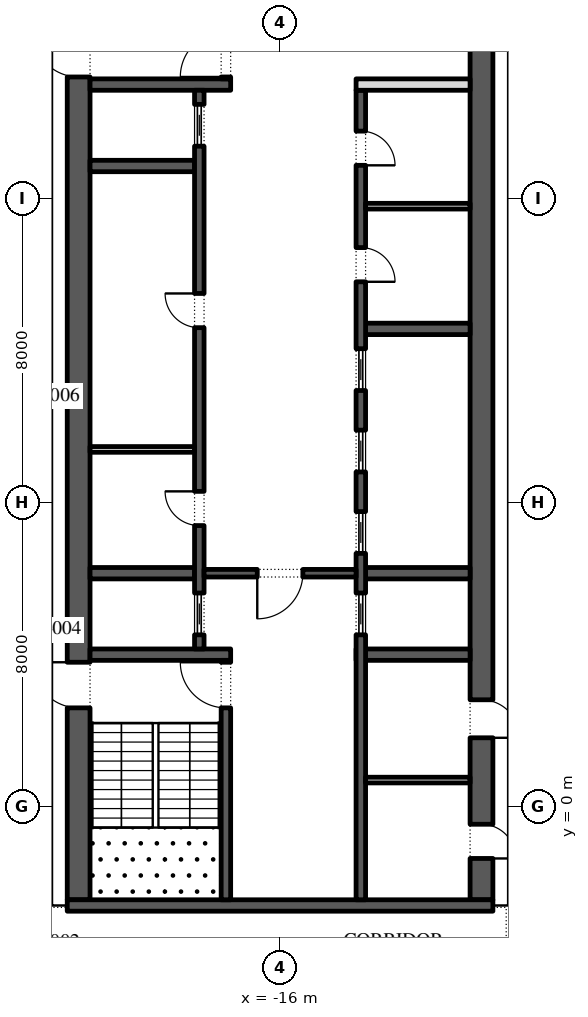
"""IFC4 building model, lengths in metres.
Left out: names, types, materials, properties, quantities, classifications, styles, units other than length and angle.
Written with IfcOpenShell. Run it as: python <this file> out.ifc"""

import sys

from ifc_helpers import new_model, si_unit, direction, frame, frame_2d, origin, place, context, subcontext, project, spatial, rectangle, extrude, element, fill, save


model = new_model("IFC4")
c1 = context("Model", 3, precision=1e-05, world=origin(), true_north=direction((0.0, 1.0)))
c2 = subcontext(c1, "Body", "Model", "MODEL_VIEW")
j1 = project(units=[si_unit("LENGTHUNIT", "METRE"), si_unit("PLANEANGLEUNIT", "RADIAN")], contexts=[c1])
p1 = place(None, origin())
s1 = spatial("IfcSite", under=j1, at=p1, CompositionType="ELEMENT")
p2 = place(p1, origin())
s2 = spatial("IfcBuilding", under=s1, at=p2, CompositionType="ELEMENT")
p3 = place(p2, frame((0.0, 0.0, 272.4)))
s3 = spatial("IfcBuildingStorey", under=s2, at=p3, CompositionType="ELEMENT", Elevation=272.4)
p4 = place(p3, frame((-21.359, 48.678, 0.0), z_axis=(0.0, 0.0, 1.0), x_axis=(-0.224949198343, -0.974370493275, 0.0)))
e1 = element("IfcWall", 1, at=p4, inside=s3, PredefinedType="STANDARD", context=c2, shape_type="SweptSolid", body=[
    extrude(rectangle(XDim=49.5, YDim=0.3, at=frame_2d((24.75, 0.0))), origin(), (0.0, 0.0, 1.0), 4.0),
])
p5 = place(p4, frame((1.157, 0.0, 0.45)))
e2 = element("IfcOpeningElement", 2, at=p5, cuts=e1, PredefinedType="OPENING", context=c2, shape_type="SweptSolid", body=[
    extrude(rectangle(XDim=4.5, YDim=3.05, at=frame_2d((2.25, 1.525))), frame((0.0, 0.16, 0.0), z_axis=(0.0, -1.0, 0.0), x_axis=(1.0, 0.0, 0.0)), (0.0, 0.0, 1.0), 0.32),
])
p6 = place(p4, frame((9.171, 0.0, 0.0)))
e3 = element("IfcOpeningElement", 3, at=p6, cuts=e1, PredefinedType="OPENING", context=c2, shape_type="SweptSolid", body=[
    extrude(rectangle(XDim=2.4, YDim=3.5, at=frame_2d((1.2, 1.75))), frame((0.0, 0.16, 0.0), z_axis=(0.0, -1.0, 0.0), x_axis=(1.0, 0.0, 0.0)), (0.0, 0.0, 1.0), 0.32),
])
p7 = place(p4, frame((15.236, 0.0, 0.45)))
e4 = element("IfcOpeningElement", 4, at=p7, cuts=e1, PredefinedType="OPENING", context=c2, shape_type="SweptSolid", body=[
    extrude(rectangle(XDim=4.5, YDim=3.05, at=frame_2d((2.25, 1.525))), frame((0.0, 0.16, 0.0), z_axis=(0.0, -1.0, 0.0), x_axis=(1.0, 0.0, 0.0)), (0.0, 0.0, 1.0), 0.32),
])
p8 = place(p4, frame((22.35, 0.0, 0.45)))
e5 = element("IfcOpeningElement", 5, at=p8, cuts=e1, PredefinedType="OPENING", context=c2, shape_type="SweptSolid", body=[
    extrude(rectangle(XDim=4.5, YDim=3.05, at=frame_2d((2.25, 1.525))), frame((0.0, 0.16, 0.0), z_axis=(0.0, -1.0, 0.0), x_axis=(1.0, 0.0, 0.0)), (0.0, 0.0, 1.0), 0.32),
])
p9 = place(p4, frame((29.464, 0.0, 0.45)))
e6 = element("IfcOpeningElement", 6, at=p9, cuts=e1, PredefinedType="OPENING", context=c2, shape_type="SweptSolid", body=[
    extrude(rectangle(XDim=4.5, YDim=3.05, at=frame_2d((2.25, 1.525))), frame((0.0, 0.16, 0.0), z_axis=(0.0, -1.0, 0.0), x_axis=(1.0, 0.0, 0.0)), (0.0, 0.0, 1.0), 0.32),
])
p10 = place(p4, frame((37.628, 0.0, 0.0)))
e7 = element("IfcOpeningElement", 7, at=p10, cuts=e1, PredefinedType="OPENING", context=c2, shape_type="SweptSolid", body=[
    extrude(rectangle(XDim=2.4, YDim=3.325, at=frame_2d((1.2, 1.663))), frame((0.0, 0.16, 0.0), z_axis=(0.0, -1.0, 0.0), x_axis=(1.0, 0.0, 0.0)), (0.0, 0.0, 1.0), 0.32),
])
p11 = place(p4, frame((43.693, 0.0, 0.45)))
e8 = element("IfcOpeningElement", 8, at=p11, cuts=e1, PredefinedType="OPENING", context=c2, shape_type="SweptSolid", body=[
    extrude(rectangle(XDim=4.5, YDim=2.825, at=frame_2d((2.25, 1.413))), frame((0.0, 0.16, 0.0), z_axis=(0.0, -1.0, 0.0), x_axis=(1.0, 0.0, 0.0)), (0.0, 0.0, 1.0), 0.32),
])
p12 = place(p3, frame((-21.3, -2.45, 0.0), z_axis=(0.0, 0.0, 1.0), x_axis=(0.0, 1.0, 0.0)))
e9 = element("IfcWall", 9, at=p12, inside=s3, PredefinedType="SHEAR", context=c2, shape_type="SweptSolid", body=[
    extrude(rectangle(XDim=27.9, YDim=0.6, at=frame_2d((13.95, 0.0))), origin(), (0.0, 0.0, 1.0), 4.0),
])
p13 = place(p12, frame((5.05, 0.0, 0.0)))
e10 = element("IfcOpeningElement", 10, at=p13, cuts=e9, PredefinedType="OPENING", context=c2, shape_type="SweptSolid", body=[
    extrude(rectangle(XDim=1.2, YDim=2.1, at=frame_2d((0.6, 1.05))), frame((0.0, 0.31, 0.0), z_axis=(0.0, -1.0, 0.0), x_axis=(1.0, 0.0, 0.0)), (0.0, 0.0, 1.0), 0.62),
])
p14 = place(p12, frame((21.65, 0.0, 0.0)))
e11 = element("IfcOpeningElement", 11, at=p14, cuts=e9, PredefinedType="OPENING", context=c2, shape_type="SweptSolid", body=[
    extrude(rectangle(XDim=1.2, YDim=2.1, at=frame_2d((0.6, 1.05))), frame((0.0, 0.31, 0.0), z_axis=(0.0, -1.0, 0.0), x_axis=(1.0, 0.0, 0.0)), (0.0, 0.0, 1.0), 0.62),
])
p15 = place(p3, frame((-10.7, -2.45, 0.0), z_axis=(0.0, 0.0, 1.0), x_axis=(0.0, 1.0, 0.0)))
e12 = element("IfcWall", 12, at=p15, inside=s3, PredefinedType="SHEAR", context=c2, shape_type="SweptSolid", body=[
    extrude(rectangle(XDim=27.9, YDim=0.6, at=frame_2d((13.95, 0.0))), origin(), (0.0, 0.0, 1.0), 4.0),
])
p16 = place(p15, frame((23.65, 0.0, 0.0)))
e13 = element("IfcOpeningElement", 13, at=p16, cuts=e12, PredefinedType="OPENING", context=c2, shape_type="SweptSolid", body=[
    extrude(rectangle(XDim=2.4, YDim=2.1, at=frame_2d((1.2, 1.05))), frame((0.0, 0.31, 0.0), z_axis=(0.0, -1.0, 0.0), x_axis=(1.0, 0.0, 0.0)), (0.0, 0.0, 1.0), 0.62),
])
p17 = place(p15, frame((1.087, 0.0, 0.0)))
e14 = element("IfcOpeningElement", 14, at=p17, cuts=e12, PredefinedType="OPENING", context=c2, shape_type="SweptSolid", body=[
    extrude(rectangle(XDim=0.9, YDim=2.1, at=frame_2d((0.45, 1.05))), frame((0.0, 0.31, 0.0), z_axis=(0.0, -1.0, 0.0), x_axis=(1.0, 0.0, 0.0)), (0.0, 0.0, 1.0), 0.62),
])
p18 = place(p15, frame((4.262, 0.0, 0.0)))
e15 = element("IfcOpeningElement", 15, at=p18, cuts=e12, PredefinedType="OPENING", context=c2, shape_type="SweptSolid", body=[
    extrude(rectangle(XDim=1.0, YDim=2.1, at=frame_2d((0.5, 1.05))), frame((0.0, 0.31, 0.0), z_axis=(0.0, -1.0, 0.0), x_axis=(1.0, 0.0, 0.0)), (0.0, 0.0, 1.0), 0.62),
])
p19 = place(p3, frame((-21.6, -2.6, 0.0), z_axis=(0.0, 0.0, 1.0), x_axis=(1.0, 0.0, 0.0)))
e16 = element("IfcWall", 16, at=p19, inside=s3, PredefinedType="SHEAR", context=c2, shape_type="SweptSolid", body=[
    extrude(rectangle(XDim=11.2, YDim=0.3, at=frame_2d((5.6, 0.0))), origin(), (0.0, 0.0, 1.0), 4.0),
])
p20 = place(p3, frame((-21.0, 4.0, 0.0), z_axis=(0.0, 0.0, 1.0), x_axis=(1.0, 0.0, 0.0)))
e17 = element("IfcWall", 17, at=p20, inside=s3, PredefinedType="SHEAR", context=c2, shape_type="SweptSolid", body=[
    extrude(rectangle(XDim=3.7, YDim=0.3, at=frame_2d((1.85, 0.0))), origin(), (0.0, 0.0, 1.0), 4.0),
])
p21 = place(p3, frame((-17.425, -2.45, 0.0), z_axis=(0.0, 0.0, 1.0), x_axis=(0.0, 1.0, 0.0)))
e18 = element("IfcWall", 18, at=p21, inside=s3, PredefinedType="SHEAR", context=c2, shape_type="SweptSolid", body=[
    extrude(rectangle(XDim=6.3, YDim=0.25, at=frame_2d((3.15, 0.0))), origin(), (0.0, 0.0, 1.0), 4.0),
])
p22 = place(p21, frame((5.05, 0.0, 0.0)))
e19 = element("IfcOpeningElement", 19, at=p22, cuts=e18, PredefinedType="OPENING", context=c2, shape_type="SweptSolid", body=[
    extrude(rectangle(XDim=1.2, YDim=2.1, at=frame_2d((0.6, 1.05))), frame((0.0, 0.135, 0.0), z_axis=(0.0, -1.0, 0.0), x_axis=(1.0, 0.0, 0.0)), (0.0, 0.0, 1.0), 0.27),
])
p23 = place(p3, frame((-21.0, 19.0, 0.0), z_axis=(0.0, 0.0, 1.0), x_axis=(1.0, 0.0, 0.0)))
e20 = element("IfcWall", 20, at=p23, inside=s3, PredefinedType="SHEAR", context=c2, shape_type="SweptSolid", body=[
    extrude(rectangle(XDim=3.7, YDim=0.3, at=frame_2d((1.85, 0.0))), origin(), (0.0, 0.0, 1.0), 4.0),
])
p24 = place(p3, frame((-17.425, 19.15, 0.0), z_axis=(0.0, 0.0, 1.0), x_axis=(0.0, 1.0, 0.0)))
e21 = element("IfcWall", 21, at=p24, inside=s3, PredefinedType="SHEAR", context=c2, shape_type="SweptSolid", body=[
    extrude(rectangle(XDim=6.3, YDim=0.25, at=frame_2d((3.15, 0.0))), origin(), (0.0, 0.0, 1.0), 4.0),
])
p25 = place(p24, frame((0.05, 0.0, 0.0)))
e22 = element("IfcOpeningElement", 22, at=p25, cuts=e21, PredefinedType="OPENING", context=c2, shape_type="SweptSolid", body=[
    extrude(rectangle(XDim=1.2, YDim=2.1, at=frame_2d((0.6, 1.05))), frame((0.0, 0.135, 0.0), z_axis=(0.0, -1.0, 0.0), x_axis=(1.0, 0.0, 0.0)), (0.0, 0.0, 1.0), 0.27),
])
for number, where, z_axis, x_axis in (
    (23, (-21.0, 6.143, 0.0), (0.0, 0.0, 1.0), (1.0, 0.0, 0.0)),
    (24, (-21.0, 16.857, 0.0), (0.0, 0.0, 1.0), (1.0, 0.0, 0.0)),
):
    element("IfcWall", number, at=place(p3, frame(where, z_axis=z_axis, x_axis=x_axis)), inside=s3, PredefinedType="SHEAR", context=c2, shape_type="SweptSolid", body=[
        extrude(rectangle(XDim=2.75, YDim=0.3, at=frame_2d((1.375, 0.0))), origin(), (0.0, 0.0, 1.0), 4.0),
    ])
p26 = place(p3, frame((-18.125, 4.15, 0.0), z_axis=(0.0, 0.0, 1.0), x_axis=(0.0, 1.0, 0.0)))
e25 = element("IfcWall", 25, at=p26, inside=s3, PredefinedType="SHEAR", context=c2, shape_type="SweptSolid", body=[
    extrude(rectangle(XDim=14.7, YDim=0.25, at=frame_2d((7.35, 0.0))), origin(), (0.0, 0.0, 1.0), 4.0),
])
p27 = place(p26, frame((3.246, 0.0, 0.0)))
e26 = element("IfcOpeningElement", 26, at=p27, cuts=e25, PredefinedType="OPENING", context=c2, shape_type="SweptSolid", body=[
    extrude(rectangle(XDim=0.9, YDim=2.1, at=frame_2d((0.45, 1.05))), frame((0.0, 0.135, 0.0), z_axis=(0.0, -1.0, 0.0), x_axis=(1.0, 0.0, 0.0)), (0.0, 0.0, 1.0), 0.27),
])
p28 = place(p26, frame((8.454, 0.0, 0.0)))
e27 = element("IfcOpeningElement", 27, at=p28, cuts=e25, PredefinedType="OPENING", context=c2, shape_type="SweptSolid", body=[
    extrude(rectangle(XDim=0.9, YDim=2.1, at=frame_2d((0.45, 1.05))), frame((0.0, 0.135, 0.0), z_axis=(0.0, -1.0, 0.0), x_axis=(1.0, 0.0, 0.0)), (0.0, 0.0, 1.0), 0.27),
])
p29 = place(p26, frame((0.371, 0.0, 0.0)))
e28 = element("IfcOpeningElement", 28, at=p29, cuts=e25, PredefinedType="OPENING", context=c2, shape_type="SweptSolid", body=[
    extrude(rectangle(XDim=1.1, YDim=2.1, at=frame_2d((0.55, 1.05))), frame((0.0, 0.135, 0.0), z_axis=(0.0, -1.0, 0.0), x_axis=(1.0, 0.0, 0.0)), (0.0, 0.0, 1.0), 0.27),
])
p30 = place(p26, frame((13.229, 0.0, 0.0)))
e29 = element("IfcOpeningElement", 29, at=p30, cuts=e25, PredefinedType="OPENING", context=c2, shape_type="SweptSolid", body=[
    extrude(rectangle(XDim=1.1, YDim=2.1, at=frame_2d((0.55, 1.05))), frame((0.0, 0.135, 0.0), z_axis=(0.0, -1.0, 0.0), x_axis=(1.0, 0.0, 0.0)), (0.0, 0.0, 1.0), 0.27),
])
p31 = place(p3, frame((-21.0, 9.4, 0.0), z_axis=(0.0, 0.0, 1.0), x_axis=(1.0, 0.0, 0.0)))
e30 = element("IfcWall", 30, at=p31, inside=s3, PredefinedType="PARTITIONING", context=c2, shape_type="SweptSolid", body=[
    extrude(rectangle(XDim=2.75, YDim=0.15, at=frame_2d((1.375, 0.0))), origin(), (0.0, 0.0, 1.0), 4.0),
])
p32 = place(p3, frame((-14.0, 4.0, 0.0), z_axis=(0.0, 0.0, 1.0), x_axis=(1.0, 0.0, 0.0)))
e31 = element("IfcWall", 31, at=p32, inside=s3, PredefinedType="SHEAR", context=c2, shape_type="SweptSolid", body=[
    extrude(rectangle(XDim=3.0, YDim=0.3, at=frame_2d((1.5, 0.0))), origin(), (0.0, 0.0, 1.0), 4.0),
])
for number, where, z_axis, x_axis in (
    (32, (-13.75, 6.143, 0.0), (0.0, 0.0, 1.0), (1.0, 0.0, 0.0)),
    (33, (-13.75, 12.571, 0.0), (0.0, 0.0, 1.0), (1.0, 0.0, 0.0)),
):
    element("IfcWall", number, at=place(p3, frame(where, z_axis=z_axis, x_axis=x_axis)), inside=s3, PredefinedType="SHEAR", context=c2, shape_type="SweptSolid", body=[
        extrude(rectangle(XDim=2.75, YDim=0.3, at=frame_2d((1.375, 0.0))), origin(), (0.0, 0.0, 1.0), 4.0),
    ])
p33 = place(p3, frame((-13.875, -2.45, 0.0), z_axis=(0.0, 0.0, 1.0), x_axis=(0.0, 1.0, 0.0)))
e34 = element("IfcWall", 34, at=p33, inside=s3, PredefinedType="SHEAR", context=c2, shape_type="SweptSolid", body=[
    extrude(rectangle(XDim=21.3, YDim=0.25, at=frame_2d((10.65, 0.0))), origin(), (0.0, 0.0, 1.0), 4.0),
])
p34 = place(p33, frame((16.261, 0.0, 0.0)))
e35 = element("IfcOpeningElement", 35, at=p34, cuts=e34, PredefinedType="OPENING", context=c2, shape_type="SweptSolid", body=[
    extrude(rectangle(XDim=0.9, YDim=2.1, at=frame_2d((0.45, 1.05))), frame((0.0, 0.135, 0.0), z_axis=(0.0, -1.0, 0.0), x_axis=(1.0, 0.0, 0.0)), (0.0, 0.0, 1.0), 0.27),
])
p35 = place(p33, frame((19.325, 0.0, 0.0)))
e36 = element("IfcOpeningElement", 36, at=p35, cuts=e34, PredefinedType="OPENING", context=c2, shape_type="SweptSolid", body=[
    extrude(rectangle(XDim=0.9, YDim=2.1, at=frame_2d((0.45, 1.05))), frame((0.0, 0.135, 0.0), z_axis=(0.0, -1.0, 0.0), x_axis=(1.0, 0.0, 0.0)), (0.0, 0.0, 1.0), 0.27),
])
p36 = place(p33, frame((6.971, 0.0, 0.0)))
e37 = element("IfcOpeningElement", 37, at=p36, cuts=e34, PredefinedType="OPENING", context=c2, shape_type="SweptSolid", body=[
    extrude(rectangle(XDim=1.1, YDim=2.1, at=frame_2d((0.55, 1.05))), frame((0.0, 0.135, 0.0), z_axis=(0.0, -1.0, 0.0), x_axis=(1.0, 0.0, 0.0)), (0.0, 0.0, 1.0), 0.27),
])
p37 = place(p33, frame((9.114, 0.0, 0.0)))
e38 = element("IfcOpeningElement", 38, at=p37, cuts=e34, PredefinedType="OPENING", context=c2, shape_type="SweptSolid", body=[
    extrude(rectangle(XDim=1.1, YDim=2.1, at=frame_2d((0.55, 1.05))), frame((0.0, 0.135, 0.0), z_axis=(0.0, -1.0, 0.0), x_axis=(1.0, 0.0, 0.0)), (0.0, 0.0, 1.0), 0.27),
])
p38 = place(p33, frame((11.257, 0.0, 0.0)))
e39 = element("IfcOpeningElement", 39, at=p38, cuts=e34, PredefinedType="OPENING", context=c2, shape_type="SweptSolid", body=[
    extrude(rectangle(XDim=1.1, YDim=2.1, at=frame_2d((0.55, 1.05))), frame((0.0, 0.135, 0.0), z_axis=(0.0, -1.0, 0.0), x_axis=(1.0, 0.0, 0.0)), (0.0, 0.0, 1.0), 0.27),
])
p39 = place(p33, frame((13.4, 0.0, 0.0)))
e40 = element("IfcOpeningElement", 40, at=p39, cuts=e34, PredefinedType="OPENING", context=c2, shape_type="SweptSolid", body=[
    extrude(rectangle(XDim=1.1, YDim=2.1, at=frame_2d((0.55, 1.05))), frame((0.0, 0.135, 0.0), z_axis=(0.0, -1.0, 0.0), x_axis=(1.0, 0.0, 0.0)), (0.0, 0.0, 1.0), 0.27),
])
p40 = place(p3, frame((-14.0, 19.0, 0.0), z_axis=(0.0, 0.0, 1.0), x_axis=(1.0, 0.0, 0.0)))
e41 = element("IfcWall", 41, at=p40, inside=s3, PredefinedType="PARTITIONING", context=c2, shape_type="SweptSolid", body=[
    extrude(rectangle(XDim=3.0, YDim=0.3, at=frame_2d((1.5, 0.0))), origin(), (0.0, 0.0, 1.0), 4.0),
])
p41 = place(p3, frame((-13.75, 15.8, 0.0), z_axis=(0.0, 0.0, 1.0), x_axis=(1.0, 0.0, 0.0)))
e42 = element("IfcWall", 42, at=p41, inside=s3, PredefinedType="PARTITIONING", context=c2, shape_type="SweptSolid", body=[
    extrude(rectangle(XDim=2.75, YDim=0.15, at=frame_2d((1.375, 0.0))), origin(), (0.0, 0.0, 1.0), 4.0),
])
p42 = place(p3, frame((-18.0, 6.143, 0.0), z_axis=(0.0, 0.0, 1.0), x_axis=(1.0, 0.0, 0.0)))
e43 = element("IfcWall", 43, at=p42, inside=s3, PredefinedType="SHEAR", context=c2, shape_type="SweptSolid", body=[
    extrude(rectangle(XDim=4.0, YDim=0.2, at=frame_2d((2.0, 0.0))), origin(), (0.0, 0.0, 1.0), 4.0),
])
p43 = place(p42, frame((1.4, 0.0, 0.0)))
e44 = element("IfcOpeningElement", 44, at=p43, cuts=e43, PredefinedType="OPENING", context=c2, shape_type="SweptSolid", body=[
    extrude(rectangle(XDim=1.2, YDim=2.1, at=frame_2d((0.6, 1.05))), frame((0.0, 0.11, 0.0), z_axis=(0.0, -1.0, 0.0), x_axis=(1.0, 0.0, 0.0)), (0.0, 0.0, 1.0), 0.22),
])
p44 = place(p3, frame((-13.75, 0.7, 0.0), z_axis=(0.0, 0.0, 1.0), x_axis=(1.0, 0.0, 0.0)))
e45 = element("IfcWall", 45, at=p44, inside=s3, PredefinedType="PARTITIONING", context=c2, shape_type="SweptSolid", body=[
    extrude(rectangle(XDim=2.75, YDim=0.15, at=frame_2d((1.375, 0.0))), origin(), (0.0, 0.0, 1.0), 4.0),
])
p45 = place(p27, origin())
e46 = element("IfcDoor", 46, at=p45, inside=s3, OperationType="SINGLE_SWING_LEFT", PredefinedType="DOOR", context=c2, shape_type="SweptSolid", body=[
    extrude(rectangle(XDim=0.9, YDim=2.1, at=frame_2d((0.45, 1.05))), frame((0.0, 0.125, 0.0), z_axis=(0.0, -1.0, 0.0), x_axis=(1.0, 0.0, 0.0)), (0.0, 0.0, 1.0), 0.05),
])
fill(e26, e46)
p46 = place(p28, origin())
e47 = element("IfcDoor", 47, at=p46, inside=s3, OperationType="SINGLE_SWING_LEFT", PredefinedType="DOOR", context=c2, shape_type="SweptSolid", body=[
    extrude(rectangle(XDim=0.9, YDim=2.1, at=frame_2d((0.45, 1.05))), frame((0.0, 0.125, 0.0), z_axis=(0.0, -1.0, 0.0), x_axis=(1.0, 0.0, 0.0)), (0.0, 0.0, 1.0), 0.05),
])
fill(e27, e47)
p47 = place(p29, origin())
e48 = element("IfcDoor", 48, at=p47, inside=s3, OperationType="SLIDING_TO_LEFT", PredefinedType="DOOR", context=c2, shape_type="SweptSolid", body=[
    extrude(rectangle(XDim=1.1, YDim=2.1, at=frame_2d((0.55, 1.05))), frame((0.0, 0.025, 0.0), z_axis=(0.0, -1.0, 0.0), x_axis=(1.0, 0.0, 0.0)), (0.0, 0.0, 1.0), 0.05),
])
fill(e28, e48)
p48 = place(p30, origin())
e49 = element("IfcDoor", 49, at=p48, inside=s3, OperationType="SLIDING_TO_LEFT", PredefinedType="DOOR", context=c2, shape_type="SweptSolid", body=[
    extrude(rectangle(XDim=1.1, YDim=2.1, at=frame_2d((0.55, 1.05))), frame((0.0, 0.025, 0.0), z_axis=(0.0, -1.0, 0.0), x_axis=(1.0, 0.0, 0.0)), (0.0, 0.0, 1.0), 0.05),
])
fill(e29, e49)
p49 = place(p34, frame((0.9, -0.2, 0.0), z_axis=(0.0, 0.0, 1.0), x_axis=(-1.0, 0.0, 0.0)))
e50 = element("IfcDoor", 50, at=p49, inside=s3, OperationType="SINGLE_SWING_LEFT", PredefinedType="DOOR", context=c2, shape_type="SweptSolid", body=[
    extrude(rectangle(XDim=0.9, YDim=2.1, at=frame_2d((0.45, 1.05))), frame((0.0, -0.075, 0.0), z_axis=(0.0, -1.0, 0.0), x_axis=(1.0, 0.0, 0.0)), (0.0, 0.0, 1.0), 0.05),
])
fill(e35, e50)
p50 = place(p35, frame((0.9, -0.2, 0.0), z_axis=(0.0, 0.0, 1.0), x_axis=(-1.0, 0.0, 0.0)))
e51 = element("IfcDoor", 51, at=p50, inside=s3, OperationType="SINGLE_SWING_LEFT", PredefinedType="DOOR", context=c2, shape_type="SweptSolid", body=[
    extrude(rectangle(XDim=0.9, YDim=2.1, at=frame_2d((0.45, 1.05))), frame((0.0, -0.075, 0.0), z_axis=(0.0, -1.0, 0.0), x_axis=(1.0, 0.0, 0.0)), (0.0, 0.0, 1.0), 0.05),
])
fill(e36, e51)
p51 = place(p36, origin())
e52 = element("IfcDoor", 52, at=p51, inside=s3, OperationType="SLIDING_TO_LEFT", PredefinedType="DOOR", context=c2, shape_type="SweptSolid", body=[
    extrude(rectangle(XDim=1.1, YDim=2.1, at=frame_2d((0.55, 1.05))), frame((0.0, 0.025, 0.0), z_axis=(0.0, -1.0, 0.0), x_axis=(1.0, 0.0, 0.0)), (0.0, 0.0, 1.0), 0.05),
])
fill(e37, e52)
p52 = place(p37, origin())
e53 = element("IfcDoor", 53, at=p52, inside=s3, OperationType="SLIDING_TO_LEFT", PredefinedType="DOOR", context=c2, shape_type="SweptSolid", body=[
    extrude(rectangle(XDim=1.1, YDim=2.1, at=frame_2d((0.55, 1.05))), frame((0.0, 0.025, 0.0), z_axis=(0.0, -1.0, 0.0), x_axis=(1.0, 0.0, 0.0)), (0.0, 0.0, 1.0), 0.05),
])
fill(e38, e53)
p53 = place(p38, origin())
e54 = element("IfcDoor", 54, at=p53, inside=s3, OperationType="SLIDING_TO_LEFT", PredefinedType="DOOR", context=c2, shape_type="SweptSolid", body=[
    extrude(rectangle(XDim=1.1, YDim=2.1, at=frame_2d((0.55, 1.05))), frame((0.0, 0.025, 0.0), z_axis=(0.0, -1.0, 0.0), x_axis=(1.0, 0.0, 0.0)), (0.0, 0.0, 1.0), 0.05),
])
fill(e39, e54)
p54 = place(p39, origin())
e55 = element("IfcDoor", 55, at=p54, inside=s3, OperationType="SLIDING_TO_LEFT", PredefinedType="DOOR", context=c2, shape_type="SweptSolid", body=[
    extrude(rectangle(XDim=1.1, YDim=2.1, at=frame_2d((0.55, 1.05))), frame((0.0, 0.025, 0.0), z_axis=(0.0, -1.0, 0.0), x_axis=(1.0, 0.0, 0.0)), (0.0, 0.0, 1.0), 0.05),
])
fill(e40, e55)
p55 = place(p43, frame((1.2, 0.0, 0.0), z_axis=(0.0, 0.0, 1.0), x_axis=(-1.0, 0.0, 0.0)))
e56 = element("IfcDoor", 56, at=p55, inside=s3, OperationType="SINGLE_SWING_LEFT", PredefinedType="DOOR", context=c2, shape_type="SweptSolid", body=[
    extrude(rectangle(XDim=1.2, YDim=2.1, at=frame_2d((0.6, 1.05))), frame((0.0, 0.025, 0.0), z_axis=(0.0, -1.0, 0.0), x_axis=(1.0, 0.0, 0.0)), (0.0, 0.0, 1.0), 0.05),
])
fill(e44, e56)
p56 = place(p22, origin())
e57 = element("IfcDoor", 57, at=p56, inside=s3, OperationType="SINGLE_SWING_LEFT", PredefinedType="DOOR", context=c2, shape_type="SweptSolid", body=[
    extrude(rectangle(XDim=1.2, YDim=2.1, at=frame_2d((0.6, 1.05))), frame((0.0, 0.025, 0.0), z_axis=(0.0, -1.0, 0.0), x_axis=(1.0, 0.0, 0.0)), (0.0, 0.0, 1.0), 0.05),
])
fill(e19, e57)
p57 = place(p13, origin())
e58 = element("IfcDoor", 58, at=p57, inside=s3, OperationType="SINGLE_SWING_LEFT", PredefinedType="DOOR", context=c2, shape_type="SweptSolid", body=[
    extrude(rectangle(XDim=1.2, YDim=2.1, at=frame_2d((0.6, 1.05))), frame((0.0, 0.025, 0.0), z_axis=(0.0, -1.0, 0.0), x_axis=(1.0, 0.0, 0.0)), (0.0, 0.0, 1.0), 0.05),
])
fill(e10, e58)
p58 = place(p25, origin())
e59 = element("IfcDoor", 59, at=p58, inside=s3, OperationType="SINGLE_SWING_RIGHT", PredefinedType="DOOR", context=c2, shape_type="SweptSolid", body=[
    extrude(rectangle(XDim=1.2, YDim=2.1, at=frame_2d((0.6, 1.05))), frame((0.0, 0.025, 0.0), z_axis=(0.0, -1.0, 0.0), x_axis=(1.0, 0.0, 0.0)), (0.0, 0.0, 1.0), 0.05),
])
fill(e22, e59)
p59 = place(p14, origin())
e60 = element("IfcDoor", 60, at=p59, inside=s3, OperationType="SINGLE_SWING_LEFT", PredefinedType="DOOR", context=c2, shape_type="SweptSolid", body=[
    extrude(rectangle(XDim=1.2, YDim=2.1, at=frame_2d((0.6, 1.05))), frame((0.0, 0.025, 0.0), z_axis=(0.0, -1.0, 0.0), x_axis=(1.0, 0.0, 0.0)), (0.0, 0.0, 1.0), 0.05),
])
fill(e11, e60)
p60 = place(p17, frame((0.9, 0.55, 0.0), z_axis=(0.0, 0.0, 1.0), x_axis=(-1.0, 0.0, 0.0)))
e61 = element("IfcDoor", 61, at=p60, inside=s3, OperationType="SINGLE_SWING_LEFT", PredefinedType="DOOR", context=c2, shape_type="SweptSolid", body=[
    extrude(rectangle(XDim=0.9, YDim=2.1, at=frame_2d((0.45, 1.05))), frame((0.0, 0.3, 0.0), z_axis=(0.0, -1.0, 0.0), x_axis=(1.0, 0.0, 0.0)), (0.0, 0.0, 1.0), 0.05),
])
fill(e14, e61)
p61 = place(p18, frame((1.0, 0.55, 0.0), z_axis=(0.0, 0.0, 1.0), x_axis=(-1.0, 0.0, 0.0)))
e62 = element("IfcDoor", 62, at=p61, inside=s3, OperationType="SINGLE_SWING_LEFT", PredefinedType="DOOR", context=c2, shape_type="SweptSolid", body=[
    extrude(rectangle(XDim=1.0, YDim=2.1, at=frame_2d((0.5, 1.05))), frame((0.0, 0.3, 0.0), z_axis=(0.0, -1.0, 0.0), x_axis=(1.0, 0.0, 0.0)), (0.0, 0.0, 1.0), 0.05),
])
fill(e15, e62)
save(model, sys.argv[1])
